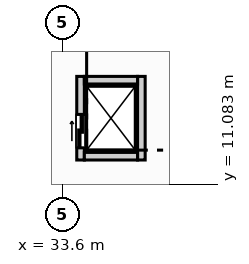
"""IFC4 building model, lengths in metres.
Left out: names, types, materials, properties, quantities, classifications, styles, units other than length and angle.
Written with IfcOpenShell. Run it as: python <this file> out.ifc"""

import sys

from ifc_helpers import new_model, si_unit, direction, frame, frame_2d, origin, place, context, subcontext, project, spatial, rectangle, extrude, element, fill, save


model = new_model("IFC4")
c1 = context("Model", 3, precision=1e-05, world=origin(), true_north=direction((0.0, 1.0)))
c2 = subcontext(c1, "Body", "Model", "MODEL_VIEW")
j1 = project(units=[si_unit("LENGTHUNIT", "METRE"), si_unit("PLANEANGLEUNIT", "RADIAN")], contexts=[c1])
p1 = place(None, origin())
s1 = spatial("IfcSite", under=j1, at=p1, CompositionType="ELEMENT")
p2 = place(p1, origin())
s2 = spatial("IfcBuilding", under=s1, at=p2, CompositionType="ELEMENT")
p3 = place(p2, frame((0.0, 0.0, -4.2)))
s3 = spatial("IfcBuildingStorey", under=s2, at=p3, CompositionType="ELEMENT", Elevation=-4.2)
p4 = place(p3, frame((34.2, 11.875, 0.0), z_axis=(0.0, 0.0, 1.0), x_axis=(0.0, 1.0, 0.0)))
e1 = element("IfcWall", 1, at=p4, inside=s3, PredefinedType="SOLIDWALL", context=c2, shape_type="SweptSolid", body=[
    extrude(rectangle(XDim=2.75, YDim=0.25, at=frame_2d((1.375, 0.0))), origin(), (0.0, 0.0, 1.0), 3.85),
])
p5 = place(p4, frame((0.4, 0.0, 0.0)))
e2 = element("IfcOpeningElement", 2, at=p5, cuts=e1, PredefinedType="OPENING", context=c2, shape_type="SweptSolid", body=[
    extrude(rectangle(XDim=1.1, YDim=2.15, at=frame_2d((0.55, 1.075))), frame((0.0, 0.135, 0.0), z_axis=(0.0, -1.0, 0.0), x_axis=(1.0, 0.0, 0.0)), (0.0, 0.0, 1.0), 0.27),
])
p6 = place(p3, frame((36.2, 11.875, 0.0), z_axis=(0.0, 0.0, 1.0), x_axis=(0.0, 1.0, 0.0)))
e3 = element("IfcWall", 3, at=p6, inside=s3, PredefinedType="SOLIDWALL", context=c2, shape_type="SweptSolid", body=[
    extrude(rectangle(XDim=2.75, YDim=0.25, at=frame_2d((1.375, 0.0))), origin(), (0.0, 0.0, 1.0), 3.85),
])
for number, where, z_axis, x_axis in (
    (4, (34.325, 12.0, 0.0), (0.0, 0.0, 1.0), (1.0, 0.0, 0.0)),
    (5, (34.325, 14.5, 0.0), (0.0, 0.0, 1.0), (1.0, 0.0, 0.0)),
):
    element("IfcWall", number, at=place(p3, frame(where, z_axis=z_axis, x_axis=x_axis)), inside=s3, PredefinedType="SOLIDWALL", context=c2, shape_type="SweptSolid", body=[
        extrude(rectangle(XDim=1.75, YDim=0.25, at=frame_2d((0.875, 0.0))), origin(), (0.0, 0.0, 1.0), 3.85),
    ])
p7 = place(p5, origin())
e6 = element("IfcDoor", 6, at=p7, inside=s3, OperationType="SLIDING_TO_LEFT", PredefinedType="DOOR", context=c2, shape_type="SweptSolid", body=[
    extrude(rectangle(XDim=1.1, YDim=2.15, at=frame_2d((0.55, 1.075))), frame((0.0, 0.025, 0.0), z_axis=(0.0, -1.0, 0.0), x_axis=(1.0, 0.0, 0.0)), (0.0, 0.0, 1.0), 0.05),
])
fill(e2, e6)
save(model, sys.argv[1])
